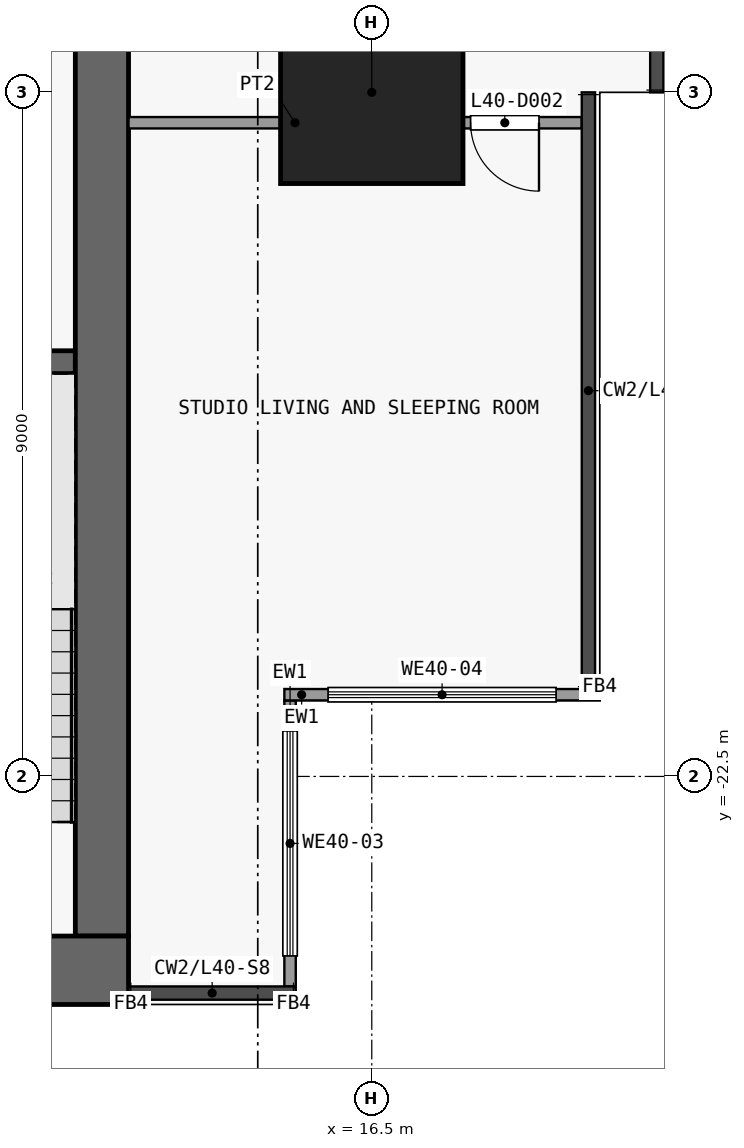
"""IFC4 building model, lengths in metres.
Left out: names, types, materials, properties, quantities, classifications, styles, units other than length and angle.
Written with IfcOpenShell. Run it as: python <this file> out.ifc"""

import sys

from ifc_helpers import new_model, si_unit, direction, frame, frame_2d, origin, origin_2d, place, context, subcontext, project, spatial, rectangle, extrude, element, fill, save


model = new_model("IFC4")
c1 = context("Model", 3, precision=1e-05, world=origin(), true_north=direction((0.0, 1.0)))
c2 = subcontext(c1, "Body", "Model", "MODEL_VIEW")
j1 = project(units=[si_unit("LENGTHUNIT", "METRE"), si_unit("PLANEANGLEUNIT", "RADIAN")], contexts=[c1])
p1 = place(None, origin())
s1 = spatial("IfcSite", under=j1, at=p1, CompositionType="ELEMENT")
p2 = place(p1, origin())
s2 = spatial("IfcBuilding", under=s1, at=p2, CompositionType="ELEMENT")
p3 = place(p2, frame((0.0, 0.0, 163.7)))
s3 = spatial("IfcBuildingStorey", under=s2, at=p3, CompositionType="ELEMENT", Elevation=163.7)
p4 = place(p3, frame((16.5, -13.5, 0.0), z_axis=(0.0, 0.0, 1.0), x_axis=(1.0, 0.0, 0.0)))
e1 = element("IfcColumn", 1, at=p4, inside=s3, PredefinedType="COLUMN", context=c2, shape_type="SweptSolid", body=[
    extrude(rectangle(XDim=2.4, YDim=2.4, at=origin_2d()), origin(), (0.0, 0.0, 1.0), 3.6),
])
p5 = place(p3, frame((-13.3, -25.05, 0.0), z_axis=(0.0, 0.0, 1.0), x_axis=(1.0, 0.0, 0.0)))
e2 = element("IfcWall", 2, at=p5, inside=s3, PredefinedType="SHEAR", context=c2, shape_type="SweptSolid", body=[
    extrude(rectangle(XDim=26.6, YDim=0.9, at=frame_2d((13.3, 0.0))), origin(), (0.0, 0.0, 1.0), 3.3),
])
p6 = place(p3, frame((12.95, -24.6, 0.0), z_axis=(0.0, 0.0, 1.0), x_axis=(0.0, 1.0, 0.0)))
e3 = element("IfcWall", 3, at=p6, inside=s3, PredefinedType="SHEAR", context=c2, shape_type="SweptSolid", body=[
    extrude(rectangle(XDim=16.1, YDim=0.7, at=frame_2d((8.05, 0.0))), origin(), (0.0, 0.0, 1.0), 3.3),
])
p7 = place(p3, frame((9.5, -17.05, 0.0), z_axis=(0.0, 0.0, 1.0), x_axis=(1.0, 0.0, 0.0)))
e4 = element("IfcWall", 4, at=p7, inside=s3, PredefinedType="SHEAR", context=c2, shape_type="SweptSolid", body=[
    extrude(rectangle(XDim=3.1, YDim=0.3, at=frame_2d((1.55, 0.0))), origin(), (0.0, 0.0, 1.0), 3.3),
])
p8 = place(p3, frame((15.425, -21.5, 0.0), z_axis=(0.0, 0.0, 1.0), x_axis=(0.0, -1.0, 0.0)))
e5 = element("IfcWall", 5, at=p8, inside=s3, PredefinedType="SOLIDWALL", context=c2, shape_type="SweptSolid", body=[
    extrude(rectangle(XDim=3.762, YDim=0.15, at=frame_2d((1.881, 0.0))), origin(), (0.0, 0.0, 1.0), 3.3),
])
p9 = place(p8, frame((0.401, 0.0, 0.9)))
e6 = element("IfcOpeningElement", 6, at=p9, cuts=e5, PredefinedType="OPENING", context=c2, shape_type="SweptSolid", body=[
    extrude(rectangle(XDim=2.96, YDim=2.4, at=frame_2d((1.48, 1.2))), frame((0.0, 0.085, 0.0), z_axis=(0.0, -1.0, 0.0), x_axis=(1.0, 0.0, 0.0)), (0.0, 0.0, 1.0), 0.17),
])
p10 = place(p3, frame((19.5, -21.425, 0.0), z_axis=(0.0, 0.0, 1.0), x_axis=(-1.0, 0.0, 0.0)))
e7 = element("IfcWall", 7, at=p10, inside=s3, PredefinedType="SOLIDWALL", context=c2, shape_type="SweptSolid", body=[
    extrude(rectangle(XDim=4.15, YDim=0.15, at=frame_2d((2.075, 0.0))), origin(), (0.0, 0.0, 1.0), 3.3),
])
p11 = place(p10, frame((0.575, 0.0, 0.9)))
e8 = element("IfcOpeningElement", 8, at=p11, cuts=e7, PredefinedType="OPENING", context=c2, shape_type="SweptSolid", body=[
    extrude(rectangle(XDim=3.0, YDim=2.4, at=frame_2d((1.5, 1.2))), frame((0.0, 0.085, 0.0), z_axis=(0.0, -1.0, 0.0), x_axis=(1.0, 0.0, 0.0)), (0.0, 0.0, 1.0), 0.17),
])
p12 = place(p3, frame((13.3, -13.9, 0.0), z_axis=(0.0, 0.0, 1.0), x_axis=(1.0, 0.0, 0.0)))
e9 = element("IfcWall", 9, at=p12, inside=s3, PredefinedType="PARTITIONING", context=c2, shape_type="SweptSolid", body=[
    extrude(rectangle(XDim=5.962, YDim=0.15, at=frame_2d((2.981, 0.0))), origin(), (0.0, 0.0, 1.0), 3.3),
])
p13 = place(p12, frame((4.5, 0.0, 0.0)))
e10 = element("IfcOpeningElement", 10, at=p13, cuts=e9, PredefinedType="OPENING", context=c2, shape_type="SweptSolid", body=[
    extrude(rectangle(XDim=0.9, YDim=2.1, at=frame_2d((0.45, 1.05))), frame((0.0, 0.085, 0.0), z_axis=(0.0, -1.0, 0.0), x_axis=(1.0, 0.0, 0.0)), (0.0, 0.0, 1.0), 0.17),
])
p14 = place(p3, frame((16.3, -13.825, 0.0), z_axis=(0.0, 0.0, 1.0), x_axis=(0.0, 1.0, 0.0)))
e11 = element("IfcWall", 11, at=p14, inside=s3, PredefinedType="PARTITIONING", context=c2, shape_type="SweptSolid", body=[
    extrude(rectangle(XDim=2.85, YDim=0.15, at=frame_2d((1.425, 0.0))), origin(), (0.0, 0.0, 1.0), 3.3),
])
p15 = place(p9, origin())
e12 = element("IfcWindow", 12, at=p15, inside=s3, PartitioningType="SINGLE_PANEL", PredefinedType="WINDOW", context=c2, shape_type="SweptSolid", body=[
    extrude(rectangle(XDim=2.96, YDim=2.4, at=frame_2d((1.48, 1.2))), frame((0.0, 0.03, 0.0), z_axis=(0.0, -1.0, 0.0), x_axis=(1.0, 0.0, 0.0)), (0.0, 0.0, 1.0), 0.06),
])
fill(e6, e12)
p16 = place(p11, origin())
e13 = element("IfcWindow", 13, at=p16, inside=s3, PartitioningType="SINGLE_PANEL", PredefinedType="WINDOW", context=c2, shape_type="SweptSolid", body=[
    extrude(rectangle(XDim=3.0, YDim=2.4, at=frame_2d((1.5, 1.2))), frame((0.0, 0.03, 0.0), z_axis=(0.0, -1.0, 0.0), x_axis=(1.0, 0.0, 0.0)), (0.0, 0.0, 1.0), 0.06),
])
fill(e8, e13)
p17 = place(p13, origin())
e14 = element("IfcDoor", 14, at=p17, inside=s3, OperationType="SINGLE_SWING_RIGHT", PredefinedType="DOOR", context=c2, shape_type="SweptSolid", body=[
    extrude(rectangle(XDim=0.9, YDim=2.1, at=frame_2d((0.45, 1.05))), frame((0.0, 0.025, 0.0), z_axis=(0.0, -1.0, 0.0), x_axis=(1.0, 0.0, 0.0)), (0.0, 0.0, 1.0), 0.05),
])
fill(e10, e14)
save(model, sys.argv[1])
